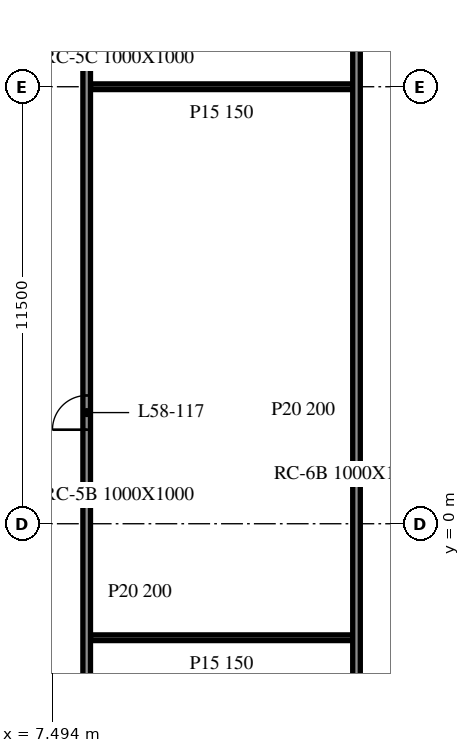
"""IFC4 building model, lengths in metres.
Left out: names, types, materials, properties, quantities, classifications, styles, units other than length and angle.
Written with IfcOpenShell. Run it as: python <this file> out.ifc"""

import sys

from ifc_helpers import new_model, si_unit, direction, frame, frame_2d, origin, place, context, subcontext, project, spatial, rectangle, extrude, element, fill, save


model = new_model("IFC4")
c1 = context("Model", 3, precision=1e-05, world=origin(), true_north=direction((0.0, 1.0)))
c2 = subcontext(c1, "Body", "Model", "MODEL_VIEW")
j1 = project(units=[si_unit("LENGTHUNIT", "METRE"), si_unit("PLANEANGLEUNIT", "RADIAN")], contexts=[c1])
p1 = place(None, origin())
s1 = spatial("IfcSite", under=j1, at=p1, CompositionType="ELEMENT")
p2 = place(p1, origin())
s2 = spatial("IfcBuilding", under=s1, at=p2, CompositionType="ELEMENT")
p3 = place(p2, frame((0.0, 0.0, 240.0)))
s3 = spatial("IfcBuildingStorey", under=s2, at=p3, CompositionType="ELEMENT", Elevation=240.0)
for number, where, z_axis, x_axis in (
    (1, (8.5, -3.0, 0.0), (0.0, 0.0, 1.0), (1.0, 0.0, 0.0)),
    (2, (8.5, 11.5, 0.0), (0.0, 0.0, 1.0), (1.0, 0.0, 0.0)),
):
    element("IfcWall", number, at=place(p3, frame(where, z_axis=z_axis, x_axis=x_axis)), inside=s3, PredefinedType="PARTITIONING", context=c2, shape_type="SweptSolid", body=[
        extrude(rectangle(XDim=6.9, YDim=0.15, at=frame_2d((3.45, 0.0))), origin(), (0.0, 0.0, 1.0), 3.46),
    ])
p4 = place(p3, frame((8.4, -9.025, 0.0), z_axis=(0.0, 0.0, 1.0), x_axis=(0.0, 1.0, 0.0)))
e3 = element("IfcWall", 3, at=p4, inside=s3, PredefinedType="PARTITIONING", context=c2, shape_type="SweptSolid", body=[
    extrude(rectangle(XDim=24.05, YDim=0.2, at=frame_2d((12.025, 0.0))), origin(), (0.0, 0.0, 1.0), 3.46),
])
p5 = place(p4, frame((11.5, 0.0, 0.0)))
e4 = element("IfcOpeningElement", 4, at=p5, cuts=e3, PredefinedType="OPENING", context=c2, shape_type="SweptSolid", body=[
    extrude(rectangle(XDim=0.9, YDim=2.1, at=frame_2d((0.45, 1.05))), frame((0.0, 0.11, 0.0), z_axis=(0.0, -1.0, 0.0), x_axis=(1.0, 0.0, 0.0)), (0.0, 0.0, 1.0), 0.22),
])
p6 = place(p3, frame((15.5, -9.025, 0.0), z_axis=(0.0, 0.0, 1.0), x_axis=(0.0, 1.0, 0.0)))
e5 = element("IfcWall", 5, at=p6, inside=s3, PredefinedType="PARTITIONING", context=c2, shape_type="SweptSolid", body=[
    extrude(rectangle(XDim=24.05, YDim=0.2, at=frame_2d((12.025, 0.0))), origin(), (0.0, 0.0, 1.0), 3.46),
])
p7 = place(p5, origin())
e6 = element("IfcDoor", 6, at=p7, inside=s3, OperationType="SINGLE_SWING_RIGHT", PredefinedType="DOOR", context=c2, shape_type="SweptSolid", body=[
    extrude(rectangle(XDim=0.9, YDim=2.1, at=frame_2d((0.45, 1.05))), frame((0.0, 0.025, 0.0), z_axis=(0.0, -1.0, 0.0), x_axis=(1.0, 0.0, 0.0)), (0.0, 0.0, 1.0), 0.05),
])
fill(e4, e6)
save(model, sys.argv[1])
